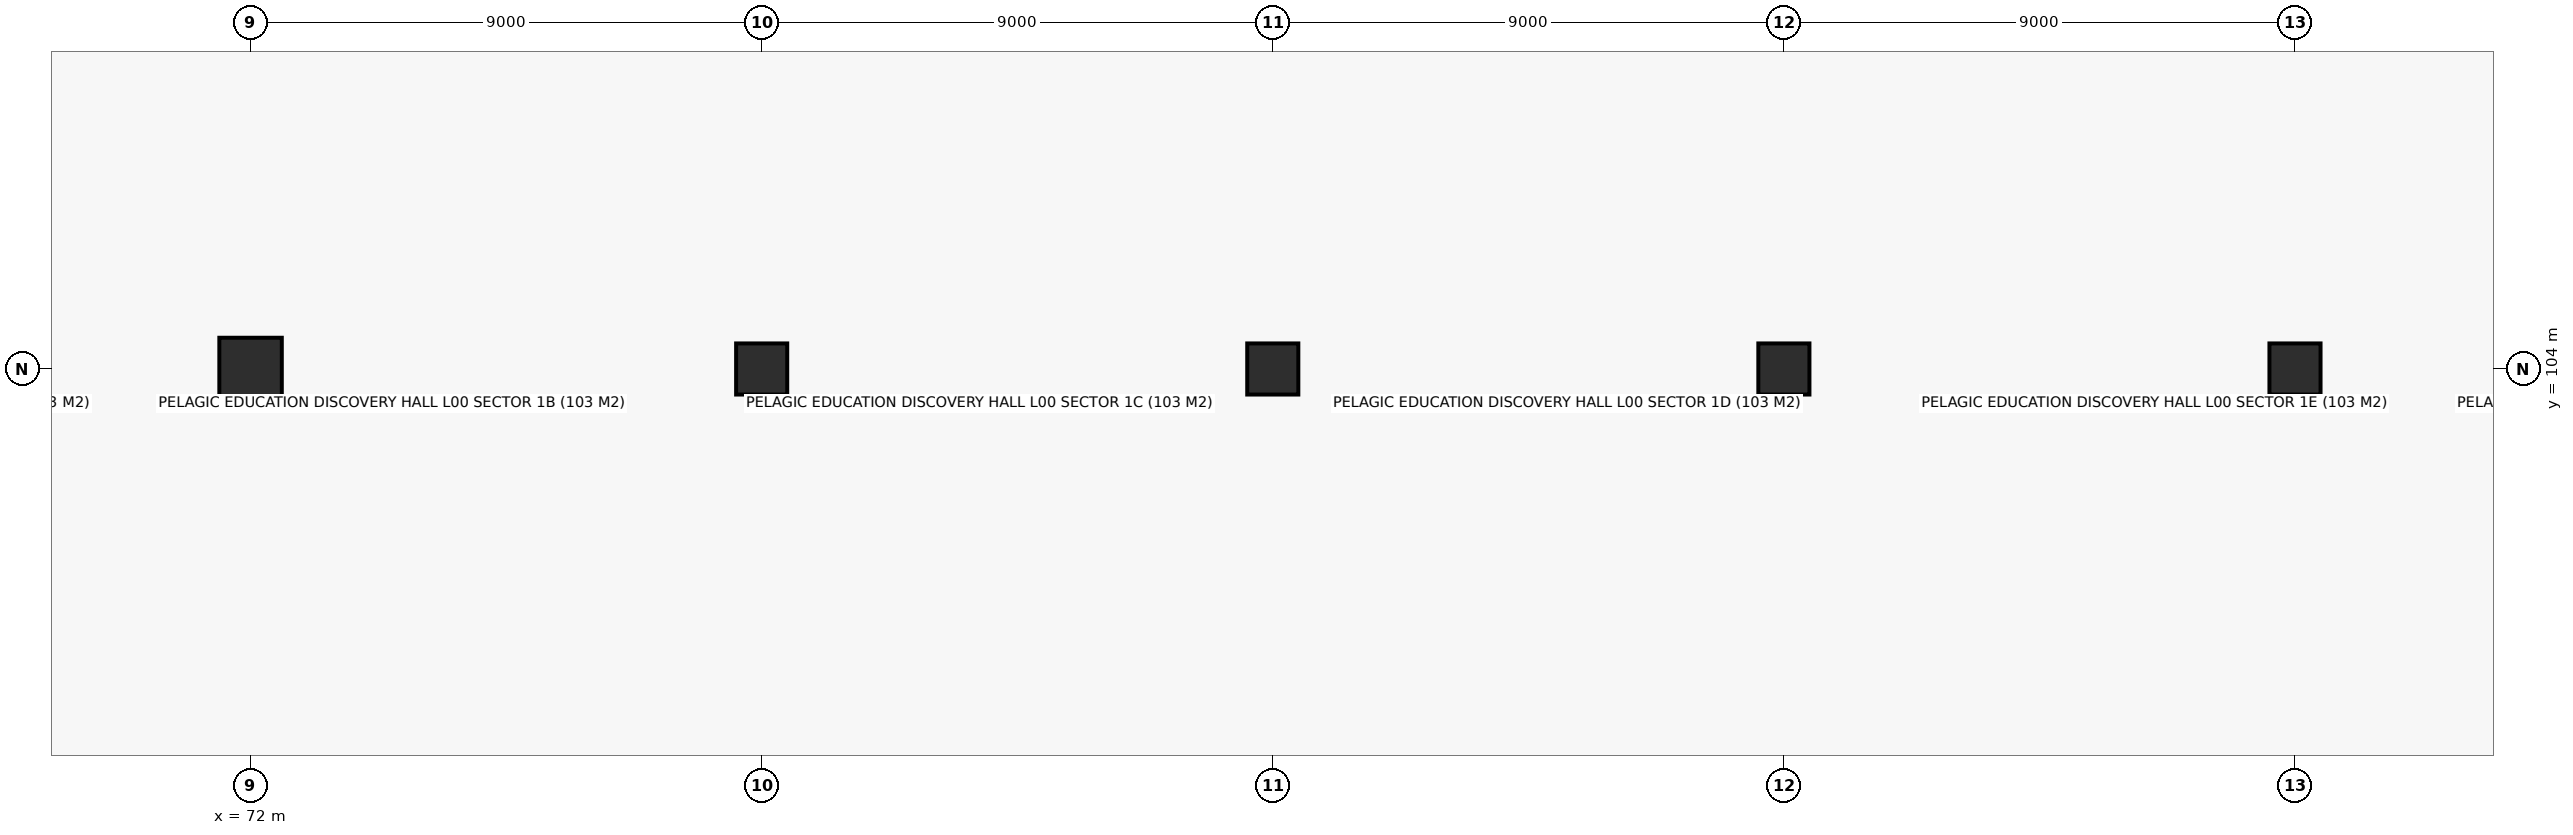
"""IFC4 building model, lengths in metres.
Left out: names, types, materials, properties, quantities, classifications, styles, units other than length and angle.
Written with IfcOpenShell. Run it as: python <this file> out.ifc"""

import sys

from ifc_helpers import new_model, si_unit, direction, frame, origin, origin_2d, place, context, subcontext, project, spatial, rectangle, extrude, element, save


model = new_model("IFC4")
c1 = context("Model", 3, precision=1e-05, world=origin(), true_north=direction((0.0, 1.0)))
c2 = subcontext(c1, "Body", "Model", "MODEL_VIEW")
j1 = project(units=[si_unit("LENGTHUNIT", "METRE"), si_unit("PLANEANGLEUNIT", "RADIAN")], contexts=[c1])
p1 = place(None, origin())
s1 = spatial("IfcSite", under=j1, at=p1, CompositionType="ELEMENT")
p2 = place(p1, origin())
s2 = spatial("IfcBuilding", under=s1, at=p2, CompositionType="ELEMENT")
p3 = place(p2, origin())
s3 = spatial("IfcBuildingStorey", under=s2, at=p3, CompositionType="ELEMENT", Elevation=0.0)
p4 = place(p3, frame((72.0, 104.0, 0.0), z_axis=(0.0, 0.0, 1.0), x_axis=(1.0, 0.0, 0.0)))
e1 = element("IfcColumn", 1, at=p4, inside=s3, PredefinedType="COLUMN", context=c2, shape_type="SweptSolid", body=[
    extrude(rectangle(XDim=1.1, YDim=1.1, at=origin_2d()), origin(), (0.0, 0.0, 1.0), 4.5),
])
for number, where, z_axis, x_axis in (
    (2, (81.0, 104.0, 0.0), (0.0, 0.0, 1.0), (1.0, 0.0, 0.0)),
    (3, (90.0, 104.0, 0.0), (0.0, 0.0, 1.0), (1.0, 0.0, 0.0)),
    (4, (99.0, 104.0, 0.0), (0.0, 0.0, 1.0), (1.0, 0.0, 0.0)),
    (5, (108.0, 104.0, 0.0), (0.0, 0.0, 1.0), (1.0, 0.0, 0.0)),
):
    element("IfcColumn", number, at=place(p3, frame(where, z_axis=z_axis, x_axis=x_axis)), inside=s3, PredefinedType="COLUMN", context=c2, shape_type="SweptSolid", body=[
        extrude(rectangle(XDim=0.9, YDim=0.9, at=origin_2d()), origin(), (0.0, 0.0, 1.0), 4.5),
    ])
save(model, sys.argv[1])
